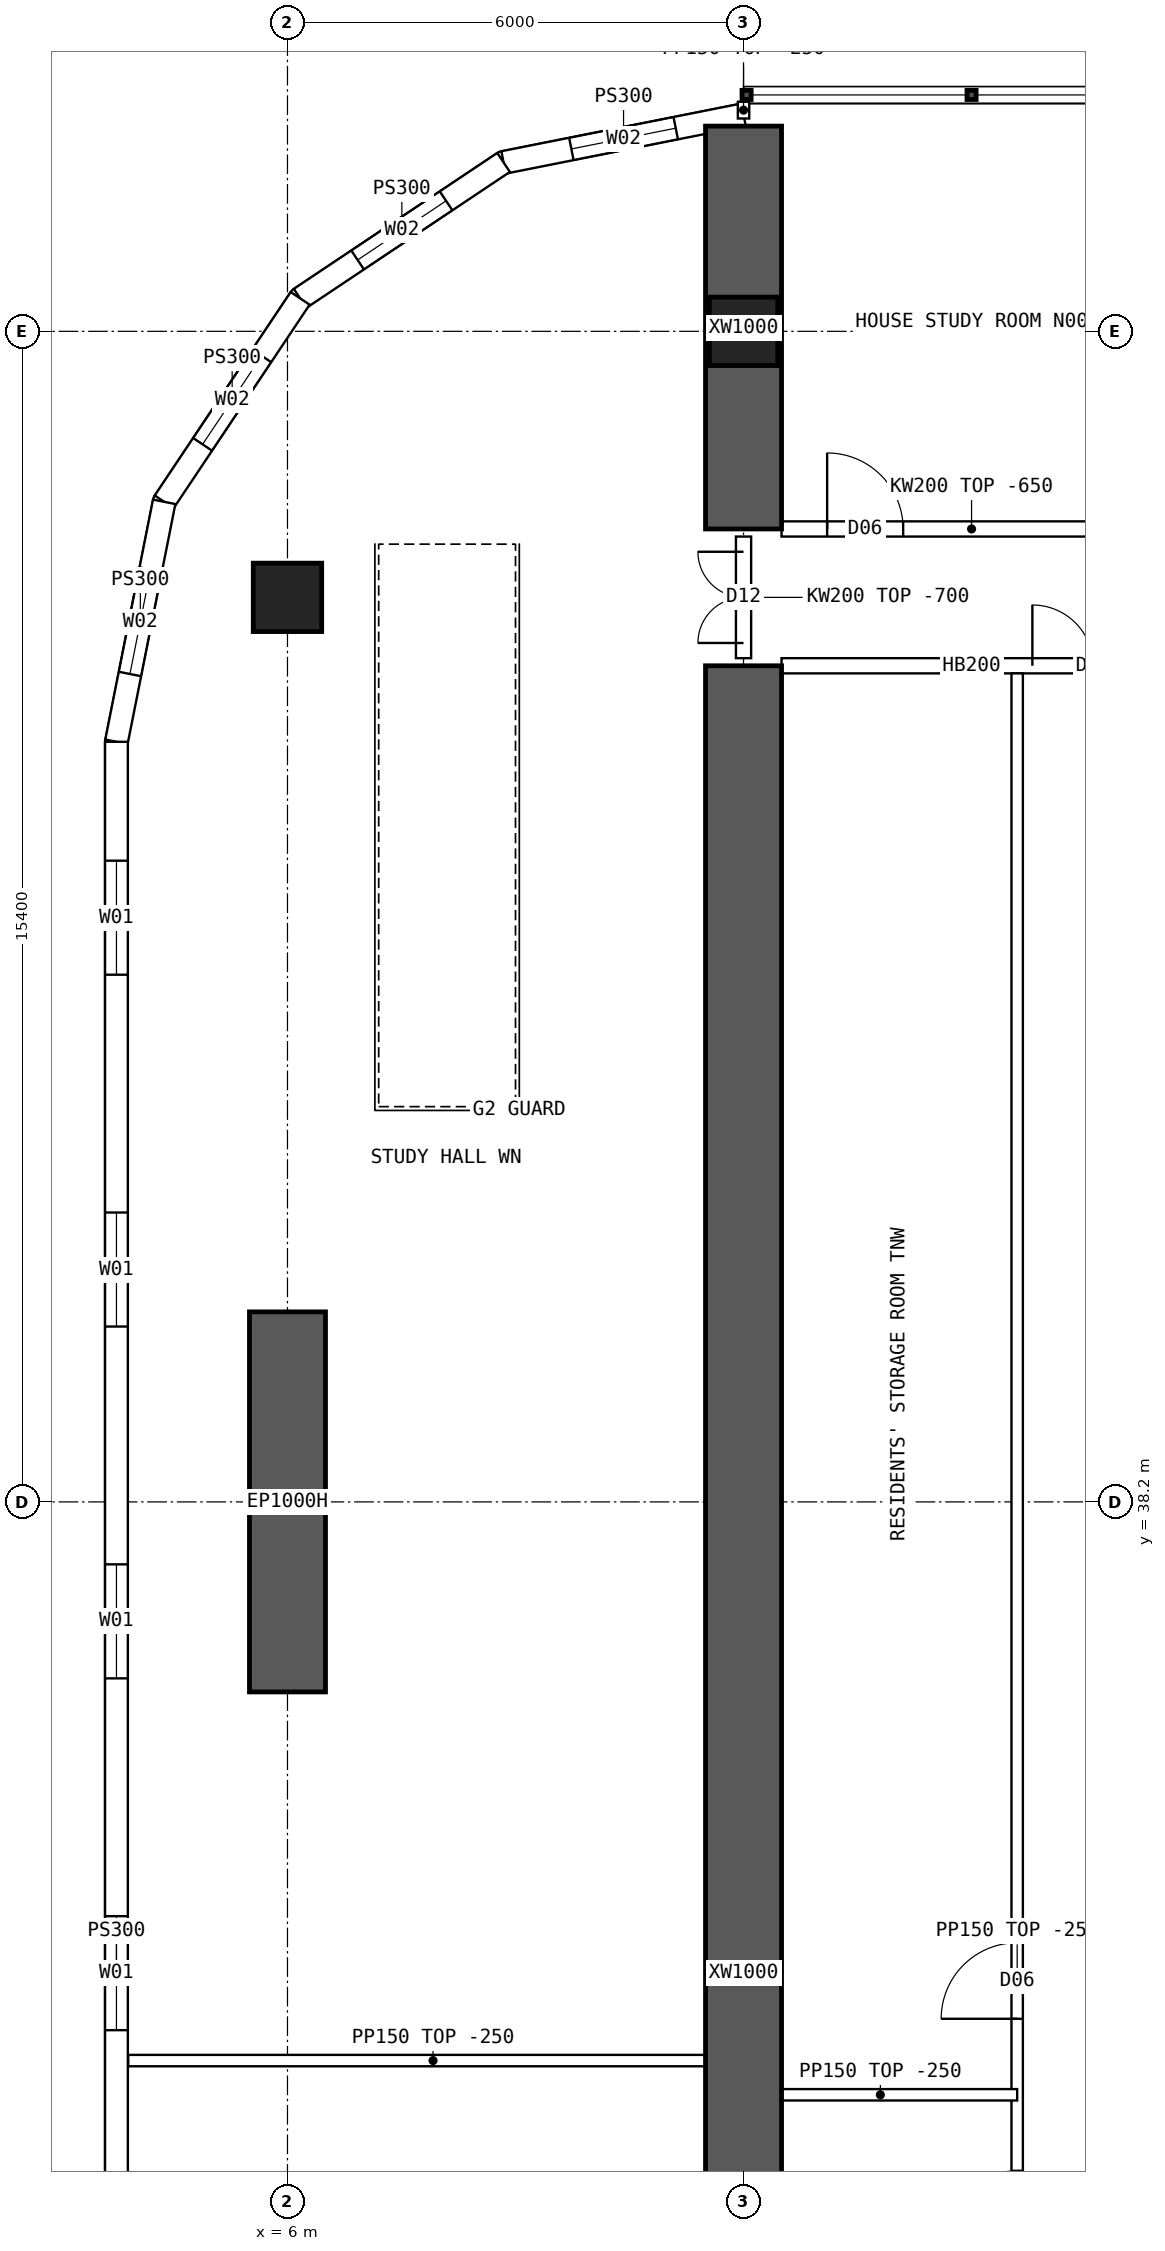
"""IFC4 building model, lengths in metres.
Left out: names, types, materials, properties, quantities, classifications, styles, units other than length and angle.
Written with IfcOpenShell. Run it as: python <this file> out.ifc"""

import sys

from ifc_helpers import new_model, si_unit, direction, frame, frame_2d, origin, origin_2d, place, context, subcontext, project, spatial, polyline, rectangle, hollow_rectangle, outline, extrude, element, fill, save


model = new_model("IFC4")
c1 = context("Model", 3, precision=1e-05, world=origin(), true_north=direction((0.0, 1.0)))
c2 = subcontext(c1, "Body", "Model", "MODEL_VIEW")
j1 = project(units=[si_unit("LENGTHUNIT", "METRE"), si_unit("PLANEANGLEUNIT", "RADIAN")], contexts=[c1])
p1 = place(None, origin())
s1 = spatial("IfcSite", under=j1, at=p1, CompositionType="ELEMENT")
p2 = place(p1, origin())
s2 = spatial("IfcBuilding", under=s1, at=p2, CompositionType="ELEMENT")
p3 = place(p2, frame((0.0, 0.0, 57.7)))
s3 = spatial("IfcBuildingStorey", under=s2, at=p3, CompositionType="ELEMENT", Elevation=57.7)
for number, where, z_axis, x_axis in (
    (1, (12.0, 53.6, 0.0), (0.0, 0.0, 1.0), (1.0, 0.0, 0.0)),
    (2, (6.0, 50.1, 0.0), (0.0, 0.0, 1.0), (1.0, 0.0, 0.0)),
):
    element("IfcColumn", number, at=place(p3, frame(where, z_axis=z_axis, x_axis=x_axis)), inside=s3, PredefinedType="COLUMN", context=c2, shape_type="SweptSolid", body=[
        extrude(hollow_rectangle(XDim=0.9, YDim=0.9, WallThickness=0.09, at=origin_2d()), origin(), (0.0, 0.0, 1.0), 3.75),
    ])
p4 = place(p3, frame((6.0, 35.7, 0.0), z_axis=(0.0, 0.0, 1.0), x_axis=(0.0, 1.0, 0.0)))
e3 = element("IfcWall", 3, at=p4, inside=s3, PredefinedType="SHEAR", context=c2, shape_type="SweptSolid", body=[
    extrude(rectangle(XDim=5.0, YDim=1.0, at=frame_2d((2.5, 0.0))), origin(), (0.0, 0.0, 1.0), 3.75),
])
p5 = place(p3, frame((12.0, 51.0, 0.0), z_axis=(0.0, 0.0, 1.0), x_axis=(0.0, 1.0, 0.0)))
e4 = element("IfcWall", 4, at=p5, inside=s3, PredefinedType="SHEAR", context=c2, shape_type="SweptSolid", body=[
    extrude(rectangle(XDim=5.3, YDim=1.0, at=frame_2d((2.65, 0.0))), origin(), (0.0, 0.0, 1.0), 3.75),
])
p6 = place(p3, frame((12.0, 14.8, 0.0), z_axis=(0.0, 0.0, 1.0), x_axis=(0.0, 1.0, 0.0)))
e5 = element("IfcWall", 5, at=p6, inside=s3, PredefinedType="SHEAR", context=c2, shape_type="SweptSolid", body=[
    extrude(rectangle(XDim=34.4, YDim=1.0, at=frame_2d((17.2, 0.0))), origin(), (0.0, 0.0, 1.0), 3.75),
])
p7 = place(p3, frame((3.75, 48.2, 0.0), z_axis=(0.0, 0.0, 1.0), x_axis=(0.0, -1.0, 0.0)))
e6 = element("IfcWall", 6, at=p7, inside=s3, PredefinedType="SOLIDWALL", context=c2, shape_type="SweptSolid", body=[
    extrude(outline(polyline([(-0.015, -0.15), (32.415, -0.15), (32.385, 0.15), (0.015, 0.15), (-0.015, -0.15)])), origin(), (0.0, 0.0, 1.0), 3.5),
])
p8 = place(p7, frame((1.564, 0.0, 0.9)))
e7 = element("IfcOpeningElement", 7, at=p8, cuts=e6, PredefinedType="OPENING", context=c2, shape_type="SweptSolid", body=[
    extrude(rectangle(XDim=1.5, YDim=2.0, at=frame_2d((0.75, 1.0))), frame((0.0, 0.16, 0.0), z_axis=(0.0, -1.0, 0.0), x_axis=(1.0, 0.0, 0.0)), (0.0, 0.0, 1.0), 0.32),
])
p9 = place(p7, frame((6.193, 0.0, 0.9)))
e8 = element("IfcOpeningElement", 8, at=p9, cuts=e6, PredefinedType="OPENING", context=c2, shape_type="SweptSolid", body=[
    extrude(rectangle(XDim=1.5, YDim=2.0, at=frame_2d((0.75, 1.0))), frame((0.0, 0.16, 0.0), z_axis=(0.0, -1.0, 0.0), x_axis=(1.0, 0.0, 0.0)), (0.0, 0.0, 1.0), 0.32),
])
p10 = place(p7, frame((10.822, 0.0, 0.9)))
e9 = element("IfcOpeningElement", 9, at=p10, cuts=e6, PredefinedType="OPENING", context=c2, shape_type="SweptSolid", body=[
    extrude(rectangle(XDim=1.5, YDim=2.0, at=frame_2d((0.75, 1.0))), frame((0.0, 0.16, 0.0), z_axis=(0.0, -1.0, 0.0), x_axis=(1.0, 0.0, 0.0)), (0.0, 0.0, 1.0), 0.32),
])
p11 = place(p7, frame((15.45, 0.0, 0.9)))
e10 = element("IfcOpeningElement", 10, at=p11, cuts=e6, PredefinedType="OPENING", context=c2, shape_type="SweptSolid", body=[
    extrude(rectangle(XDim=1.5, YDim=2.0, at=frame_2d((0.75, 1.0))), frame((0.0, 0.16, 0.0), z_axis=(0.0, -1.0, 0.0), x_axis=(1.0, 0.0, 0.0)), (0.0, 0.0, 1.0), 0.32),
])
p12 = place(p7, frame((20.079, 0.0, 0.9)))
e11 = element("IfcOpeningElement", 11, at=p12, cuts=e6, PredefinedType="OPENING", context=c2, shape_type="SweptSolid", body=[
    extrude(rectangle(XDim=1.5, YDim=2.0, at=frame_2d((0.75, 1.0))), frame((0.0, 0.16, 0.0), z_axis=(0.0, -1.0, 0.0), x_axis=(1.0, 0.0, 0.0)), (0.0, 0.0, 1.0), 0.32),
])
p13 = place(p7, frame((24.707, 0.0, 0.9)))
e12 = element("IfcOpeningElement", 12, at=p13, cuts=e6, PredefinedType="OPENING", context=c2, shape_type="SweptSolid", body=[
    extrude(rectangle(XDim=1.5, YDim=2.0, at=frame_2d((0.75, 1.0))), frame((0.0, 0.16, 0.0), z_axis=(0.0, -1.0, 0.0), x_axis=(1.0, 0.0, 0.0)), (0.0, 0.0, 1.0), 0.32),
])
p14 = place(p7, frame((29.336, 0.0, 0.9)))
e13 = element("IfcOpeningElement", 13, at=p14, cuts=e6, PredefinedType="OPENING", context=c2, shape_type="SweptSolid", body=[
    extrude(rectangle(XDim=1.5, YDim=2.0, at=frame_2d((0.75, 1.0))), frame((0.0, 0.16, 0.0), z_axis=(0.0, -1.0, 0.0), x_axis=(1.0, 0.0, 0.0)), (0.0, 0.0, 1.0), 0.32),
])
p15 = place(p3, frame((12.0, 56.45, 0.0), z_axis=(0.0, 0.0, 1.0), x_axis=(-0.980787251524, -0.195080412259, 0.0)))
e14 = element("IfcWall", 14, at=p15, inside=s3, PredefinedType="SOLIDWALL", context=c2, shape_type="SweptSolid", body=[
    extrude(outline(polyline([(-0.03, -0.15), (3.249, -0.15), (3.189, 0.15), (0.03, 0.15), (-0.03, -0.15)])), origin(), (0.0, 0.0, 1.0), 3.5),
])
p16 = place(p15, frame((0.909, 0.0, 0.9)))
e15 = element("IfcOpeningElement", 15, at=p16, cuts=e14, PredefinedType="OPENING", context=c2, shape_type="SweptSolid", body=[
    extrude(rectangle(XDim=1.4, YDim=1.8, at=frame_2d((0.7, 0.9))), frame((0.0, 0.16, 0.0), z_axis=(0.0, -1.0, 0.0), x_axis=(1.0, 0.0, 0.0)), (0.0, 0.0, 1.0), 0.32),
])
p17 = place(p3, frame((8.843, 55.822, 0.0), z_axis=(0.0, 0.0, 1.0), x_axis=(-0.831478105043, -0.555557522525, 0.0)))
e16 = element("IfcWall", 16, at=p17, inside=s3, PredefinedType="SOLIDWALL", context=c2, shape_type="SweptSolid", body=[
    extrude(outline(polyline([(-0.03, -0.15), (3.249, -0.15), (3.189, 0.15), (0.03, 0.15), (-0.03, -0.15)])), origin(), (0.0, 0.0, 1.0), 3.5),
])
p18 = place(p17, frame((0.909, 0.0, 0.9)))
e17 = element("IfcOpeningElement", 17, at=p18, cuts=e16, PredefinedType="OPENING", context=c2, shape_type="SweptSolid", body=[
    extrude(rectangle(XDim=1.4, YDim=1.8, at=frame_2d((0.7, 0.9))), frame((0.0, 0.16, 0.0), z_axis=(0.0, -1.0, 0.0), x_axis=(1.0, 0.0, 0.0)), (0.0, 0.0, 1.0), 0.32),
])
p19 = place(p3, frame((6.167, 54.034, 0.0), z_axis=(0.0, 0.0, 1.0), x_axis=(-0.555609954424, -0.831443069936, 0.0)))
e18 = element("IfcWall", 18, at=p19, inside=s3, PredefinedType="SOLIDWALL", context=c2, shape_type="SweptSolid", body=[
    extrude(outline(polyline([(-0.03, -0.15), (3.249, -0.15), (3.189, 0.15), (0.03, 0.15), (-0.03, -0.15)])), origin(), (0.0, 0.0, 1.0), 3.5),
])
p20 = place(p19, frame((0.909, 0.0, 0.9)))
e19 = element("IfcOpeningElement", 19, at=p20, cuts=e18, PredefinedType="OPENING", context=c2, shape_type="SweptSolid", body=[
    extrude(rectangle(XDim=1.4, YDim=1.8, at=frame_2d((0.7, 0.9))), frame((0.0, 0.16, 0.0), z_axis=(0.0, -1.0, 0.0), x_axis=(1.0, 0.0, 0.0)), (0.0, 0.0, 1.0), 0.32),
])
p21 = place(p3, frame((4.378, 51.357, 0.0), z_axis=(0.0, 0.0, 1.0), x_axis=(-0.195065901187, -0.980790137692, 0.0)))
e20 = element("IfcWall", 20, at=p21, inside=s3, PredefinedType="SOLIDWALL", context=c2, shape_type="SweptSolid", body=[
    extrude(outline(polyline([(-0.03, -0.15), (3.234, -0.15), (3.204, 0.15), (0.03, 0.15), (-0.03, -0.15)])), origin(), (0.0, 0.0, 1.0), 3.5),
])
p22 = place(p21, frame((0.909, 0.0, 0.9)))
e21 = element("IfcOpeningElement", 21, at=p22, cuts=e20, PredefinedType="OPENING", context=c2, shape_type="SweptSolid", body=[
    extrude(rectangle(XDim=1.4, YDim=1.8, at=frame_2d((0.7, 0.9))), frame((0.0, 0.16, 0.0), z_axis=(0.0, -1.0, 0.0), x_axis=(1.0, 0.0, 0.0)), (0.0, 0.0, 1.0), 0.32),
])
p23 = place(p3, frame((12.5, 51.0, 0.0), z_axis=(0.0, 0.0, 1.0), x_axis=(1.0, 0.0, 0.0)))
e22 = element("IfcWall", 22, at=p23, inside=s3, PredefinedType="SOLIDWALL", context=c2, shape_type="SweptSolid", body=[
    extrude(outline(polyline([(0.0, 0.0), (5.0, 0.0), (5.0, 3.1), (0.0, 3.1), (0.0, 0.0)])), frame((0.0, 0.1, 0.0), z_axis=(0.0, -1.0, 0.0), x_axis=(1.0, 0.0, 0.0)), (0.0, 0.0, 1.0), 0.2),
])
p24 = place(p23, frame((0.6, 0.0, 0.0)))
e23 = element("IfcOpeningElement", 23, at=p24, cuts=e22, PredefinedType="OPENING", context=c2, shape_type="SweptSolid", body=[
    extrude(rectangle(XDim=1.0, YDim=2.1, at=frame_2d((0.5, 1.05))), frame((0.0, 0.11, 0.0), z_axis=(0.0, -1.0, 0.0), x_axis=(1.0, 0.0, 0.0)), (0.0, 0.0, 1.0), 0.22),
])
p25 = place(p3, frame((12.5, 49.2, 0.0), z_axis=(0.0, 0.0, 1.0), x_axis=(1.0, 0.0, 0.0)))
e24 = element("IfcWall", 24, at=p25, inside=s3, PredefinedType="SOLIDWALL", context=c2, shape_type="SweptSolid", body=[
    extrude(rectangle(XDim=5.0, YDim=0.2, at=frame_2d((2.5, 0.0))), origin(), (0.0, 0.0, 1.0), 3.5),
])
p26 = place(p25, frame((3.3, 0.0, 0.0)))
e25 = element("IfcOpeningElement", 25, at=p26, cuts=e24, PredefinedType="OPENING", context=c2, shape_type="SweptSolid", body=[
    extrude(rectangle(XDim=1.6, YDim=2.1, at=frame_2d((0.8, 1.05))), frame((0.0, 0.11, 0.0), z_axis=(0.0, -1.0, 0.0), x_axis=(1.0, 0.0, 0.0)), (0.0, 0.0, 1.0), 0.22),
])
p27 = place(p3, frame((15.6, 14.9, 0.0), z_axis=(0.0, 0.0, 1.0), x_axis=(0.0, 1.0, 0.0)))
e26 = element("IfcWall", 26, at=p27, inside=s3, PredefinedType="PARTITIONING", context=c2, shape_type="SweptSolid", body=[
    extrude(rectangle(XDim=34.2, YDim=0.15, at=frame_2d((17.1, 0.0))), origin(), (0.0, 0.0, 1.0), 3.5),
])
p28 = place(p27, frame((13.5, 0.0, 0.0)))
e27 = element("IfcOpeningElement", 27, at=p28, cuts=e26, PredefinedType="OPENING", context=c2, shape_type="SweptSolid", body=[
    extrude(rectangle(XDim=1.0, YDim=2.1, at=frame_2d((0.5, 1.05))), frame((0.0, 0.085, 0.0), z_axis=(0.0, -1.0, 0.0), x_axis=(1.0, 0.0, 0.0)), (0.0, 0.0, 1.0), 0.17),
])
p29 = place(p27, frame((16.5, 0.0, 0.0)))
e28 = element("IfcOpeningElement", 28, at=p29, cuts=e26, PredefinedType="OPENING", context=c2, shape_type="SweptSolid", body=[
    extrude(rectangle(XDim=1.0, YDim=2.1, at=frame_2d((0.5, 1.05))), frame((0.0, 0.085, 0.0), z_axis=(0.0, -1.0, 0.0), x_axis=(1.0, 0.0, 0.0)), (0.0, 0.0, 1.0), 0.17),
])
p30 = place(p3, frame((12.0, 30.4, 0.0), z_axis=(0.0, 0.0, 1.0), x_axis=(1.0, 0.0, 0.0)))
e29 = element("IfcWall", 29, at=p30, inside=s3, PredefinedType="PARTITIONING", context=c2, shape_type="SweptSolid", body=[
    extrude(rectangle(XDim=3.6, YDim=0.15, at=frame_2d((1.8, 0.0))), origin(), (0.0, 0.0, 1.0), 3.5),
])
p31 = place(p3, frame((3.905, 30.85, 0.0), z_axis=(0.0, 0.0, 1.0), x_axis=(1.0, 0.0, 0.0)))
e30 = element("IfcWall", 30, at=p31, inside=s3, PredefinedType="PARTITIONING", context=c2, shape_type="SweptSolid", body=[
    extrude(outline(polyline([(0.0, 0.0), (8.02, 0.0), (8.02, 3.5), (2.397, 3.5), (2.395, 3.05), (1.797, 3.05), (1.795, 3.5), (0.0, 3.5), (0.0, 0.0)])), frame((0.0, 0.075, 0.0), z_axis=(0.0, -1.0, 0.0), x_axis=(1.0, 0.0, 0.0)), (0.0, 0.0, 1.0), 0.15),
])
p32 = place(p3, frame((12.0, 49.3, 0.0), z_axis=(0.0, 0.0, 1.0), x_axis=(0.0, 1.0, 0.0)))
e31 = element("IfcWall", 31, at=p32, inside=s3, PredefinedType="SOLIDWALL", context=c2, shape_type="SweptSolid", body=[
    extrude(outline(polyline([(0.0, 0.0), (1.6, 0.0), (1.6, 3.05), (0.0, 3.05), (0.0, 0.0)])), frame((0.0, 0.1, 0.0), z_axis=(0.0, -1.0, 0.0), x_axis=(1.0, 0.0, 0.0)), (0.0, 0.0, 1.0), 0.2),
])
p33 = place(p32, frame((0.2, 0.0, 0.0)))
e32 = element("IfcOpeningElement", 32, at=p33, cuts=e31, PredefinedType="OPENING", context=c2, shape_type="SweptSolid", body=[
    extrude(rectangle(XDim=1.2, YDim=2.1, at=frame_2d((0.6, 1.05))), frame((0.0, 0.11, 0.0), z_axis=(0.0, -1.0, 0.0), x_axis=(1.0, 0.0, 0.0)), (0.0, 0.0, 1.0), 0.22),
])
p34 = place(p3, frame((12.0, 56.4, 0.0), z_axis=(0.0, 0.0, 1.0), x_axis=(0.0, 1.0, 0.0)))
e33 = element("IfcWall", 33, at=p34, inside=s3, PredefinedType="PARTITIONING", context=c2, shape_type="SweptSolid", body=[
    extrude(rectangle(XDim=0.22, YDim=0.15, at=frame_2d((0.11, 0.0))), origin(), (0.0, 0.0, 1.0), 3.5),
])
p35 = place(p8, origin())
e34 = element("IfcWindow", 34, at=p35, inside=s3, PartitioningType="SINGLE_PANEL", PredefinedType="WINDOW", context=c2, shape_type="SweptSolid", body=[
    extrude(rectangle(XDim=1.5, YDim=2.0, at=frame_2d((0.75, 1.0))), frame((0.0, 0.03, 0.0), z_axis=(0.0, -1.0, 0.0), x_axis=(1.0, 0.0, 0.0)), (0.0, 0.0, 1.0), 0.06),
])
fill(e7, e34)
p36 = place(p9, origin())
e35 = element("IfcWindow", 35, at=p36, inside=s3, PartitioningType="SINGLE_PANEL", PredefinedType="WINDOW", context=c2, shape_type="SweptSolid", body=[
    extrude(rectangle(XDim=1.5, YDim=2.0, at=frame_2d((0.75, 1.0))), frame((0.0, 0.03, 0.0), z_axis=(0.0, -1.0, 0.0), x_axis=(1.0, 0.0, 0.0)), (0.0, 0.0, 1.0), 0.06),
])
fill(e8, e35)
p37 = place(p10, origin())
e36 = element("IfcWindow", 36, at=p37, inside=s3, PartitioningType="SINGLE_PANEL", PredefinedType="WINDOW", context=c2, shape_type="SweptSolid", body=[
    extrude(rectangle(XDim=1.5, YDim=2.0, at=frame_2d((0.75, 1.0))), frame((0.0, 0.03, 0.0), z_axis=(0.0, -1.0, 0.0), x_axis=(1.0, 0.0, 0.0)), (0.0, 0.0, 1.0), 0.06),
])
fill(e9, e36)
p38 = place(p11, origin())
e37 = element("IfcWindow", 37, at=p38, inside=s3, PartitioningType="SINGLE_PANEL", PredefinedType="WINDOW", context=c2, shape_type="SweptSolid", body=[
    extrude(rectangle(XDim=1.5, YDim=2.0, at=frame_2d((0.75, 1.0))), frame((0.0, 0.03, 0.0), z_axis=(0.0, -1.0, 0.0), x_axis=(1.0, 0.0, 0.0)), (0.0, 0.0, 1.0), 0.06),
])
fill(e10, e37)
p39 = place(p16, origin())
e38 = element("IfcWindow", 38, at=p39, inside=s3, PartitioningType="SINGLE_PANEL", PredefinedType="WINDOW", context=c2, shape_type="SweptSolid", body=[
    extrude(rectangle(XDim=1.4, YDim=1.8, at=frame_2d((0.7, 0.9))), frame((0.0, 0.03, 0.0), z_axis=(0.0, -1.0, 0.0), x_axis=(1.0, 0.0, 0.0)), (0.0, 0.0, 1.0), 0.06),
])
fill(e15, e38)
p40 = place(p18, origin())
e39 = element("IfcWindow", 39, at=p40, inside=s3, PartitioningType="SINGLE_PANEL", PredefinedType="WINDOW", context=c2, shape_type="SweptSolid", body=[
    extrude(rectangle(XDim=1.4, YDim=1.8, at=frame_2d((0.7, 0.9))), frame((0.0, 0.03, 0.0), z_axis=(0.0, -1.0, 0.0), x_axis=(1.0, 0.0, 0.0)), (0.0, 0.0, 1.0), 0.06),
])
fill(e17, e39)
p41 = place(p20, origin())
e40 = element("IfcWindow", 40, at=p41, inside=s3, PartitioningType="SINGLE_PANEL", PredefinedType="WINDOW", context=c2, shape_type="SweptSolid", body=[
    extrude(rectangle(XDim=1.4, YDim=1.8, at=frame_2d((0.7, 0.9))), frame((0.0, 0.03, 0.0), z_axis=(0.0, -1.0, 0.0), x_axis=(1.0, 0.0, 0.0)), (0.0, 0.0, 1.0), 0.06),
])
fill(e19, e40)
p42 = place(p22, origin())
e41 = element("IfcWindow", 41, at=p42, inside=s3, PartitioningType="SINGLE_PANEL", PredefinedType="WINDOW", context=c2, shape_type="SweptSolid", body=[
    extrude(rectangle(XDim=1.4, YDim=1.8, at=frame_2d((0.7, 0.9))), frame((0.0, 0.03, 0.0), z_axis=(0.0, -1.0, 0.0), x_axis=(1.0, 0.0, 0.0)), (0.0, 0.0, 1.0), 0.06),
])
fill(e21, e41)
p43 = place(p26, origin())
e42 = element("IfcDoor", 42, at=p43, inside=s3, OperationType="DOUBLE_DOOR_SINGLE_SWING", PredefinedType="DOOR", context=c2, shape_type="SweptSolid", body=[
    extrude(rectangle(XDim=1.6, YDim=2.1, at=frame_2d((0.8, 1.05))), frame((0.0, 0.025, 0.0), z_axis=(0.0, -1.0, 0.0), x_axis=(1.0, 0.0, 0.0)), (0.0, 0.0, 1.0), 0.05),
])
fill(e25, e42)
p44 = place(p24, origin())
e43 = element("IfcDoor", 43, at=p44, inside=s3, OperationType="SINGLE_SWING_LEFT", PredefinedType="DOOR", context=c2, shape_type="SweptSolid", body=[
    extrude(rectangle(XDim=1.0, YDim=2.1, at=frame_2d((0.5, 1.05))), frame((0.0, 0.025, 0.0), z_axis=(0.0, -1.0, 0.0), x_axis=(1.0, 0.0, 0.0)), (0.0, 0.0, 1.0), 0.05),
])
fill(e23, e43)
p45 = place(p29, origin())
e44 = element("IfcDoor", 44, at=p45, inside=s3, OperationType="SINGLE_SWING_LEFT", PredefinedType="DOOR", context=c2, shape_type="SweptSolid", body=[
    extrude(rectangle(XDim=1.0, YDim=2.1, at=frame_2d((0.5, 1.05))), frame((0.0, 0.025, 0.0), z_axis=(0.0, -1.0, 0.0), x_axis=(1.0, 0.0, 0.0)), (0.0, 0.0, 1.0), 0.05),
])
fill(e28, e44)
p46 = place(p33, origin())
e45 = element("IfcDoor", 45, at=p46, inside=s3, OperationType="DOUBLE_DOOR_SINGLE_SWING", PredefinedType="DOOR", context=c2, shape_type="SweptSolid", body=[
    extrude(rectangle(XDim=1.2, YDim=2.1, at=frame_2d((0.6, 1.05))), frame((0.0, 0.025, 0.0), z_axis=(0.0, -1.0, 0.0), x_axis=(1.0, 0.0, 0.0)), (0.0, 0.0, 1.0), 0.05),
])
fill(e32, e45)
save(model, sys.argv[1])
